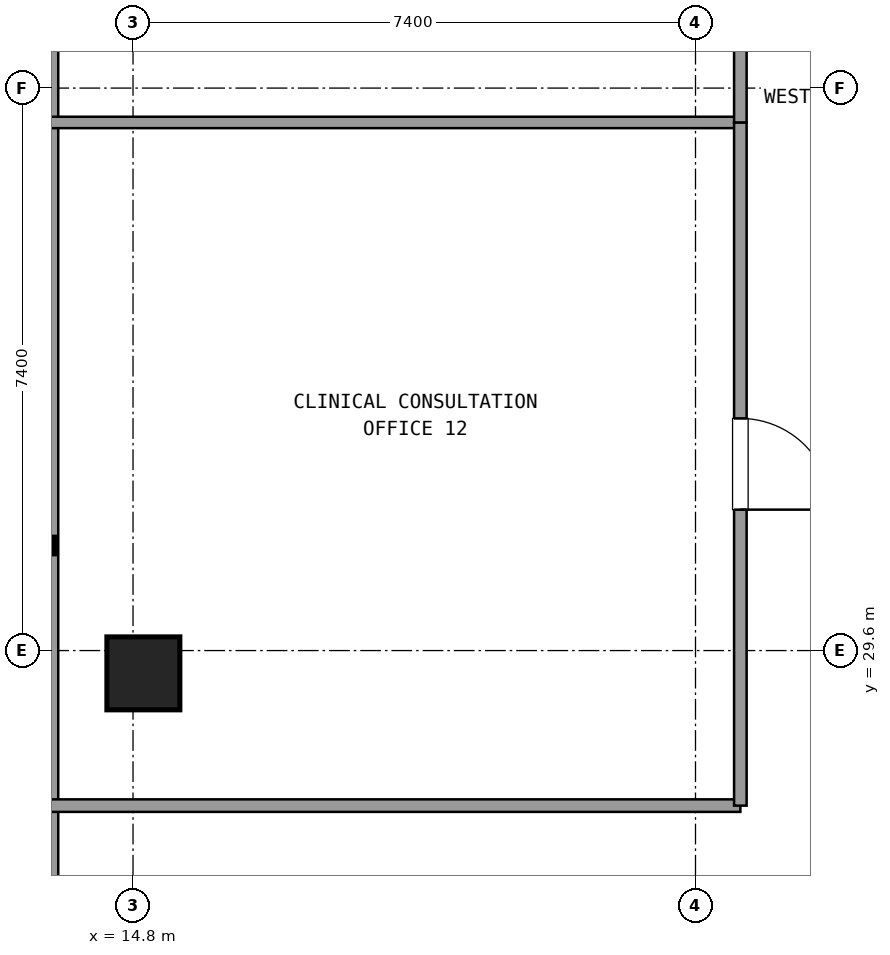
"""IFC4 building model, lengths in metres.
Left out: names, types, materials, properties, quantities, classifications, styles, units other than length and angle.
Written with IfcOpenShell. Run it as: python <this file> out.ifc"""

import sys

from ifc_helpers import new_model, si_unit, direction, frame, frame_2d, origin, origin_2d, place, context, subcontext, project, spatial, rectangle, extrude, element, fill, save


model = new_model("IFC4")
c1 = context("Model", 3, precision=1e-05, world=origin(), true_north=direction((0.0, 1.0)))
c2 = subcontext(c1, "Body", "Model", "MODEL_VIEW")
j1 = project(units=[si_unit("LENGTHUNIT", "METRE"), si_unit("PLANEANGLEUNIT", "RADIAN")], contexts=[c1])
p1 = place(None, origin())
s1 = spatial("IfcSite", under=j1, at=p1, CompositionType="ELEMENT")
p2 = place(p1, origin())
s2 = spatial("IfcBuilding", under=s1, at=p2, CompositionType="ELEMENT")
p3 = place(p2, frame((0.0, 0.0, 138.42)))
s3 = spatial("IfcBuildingStorey", under=s2, at=p3, CompositionType="ELEMENT", Elevation=138.42)
p4 = place(p3, frame((14.936, 29.3, 0.0), z_axis=(0.0, 0.0, 1.0), x_axis=(1.0, 0.0, 0.0)))
e1 = element("IfcColumn", 1, at=p4, inside=s3, PredefinedType="COLUMN", context=c2, shape_type="SweptSolid", body=[
    extrude(rectangle(XDim=0.96, YDim=0.96, at=origin_2d()), origin(), (0.0, 0.0, 1.0), 3.6),
])
p5 = place(p3, frame((13.696, 41.145, 0.0), z_axis=(0.0, 0.0, 1.0), x_axis=(0.0, -1.0, 0.0)))
e2 = element("IfcWall", 2, at=p5, inside=s3, PredefinedType="SOLIDWALL", context=c2, shape_type="SweptSolid", body=[
    extrude(rectangle(XDim=30.49, YDim=0.24, at=frame_2d((15.245, 0.0))), origin(), (0.0, 0.0, 1.0), 0.85),
])
p6 = place(p3, frame((13.716, 27.56, 0.0), z_axis=(0.0, 0.0, 1.0), x_axis=(1.0, 0.0, 0.0)))
e3 = element("IfcWall", 3, at=p6, inside=s3, PredefinedType="PARTITIONING", context=c2, shape_type="SweptSolid", body=[
    extrude(rectangle(XDim=9.074, YDim=0.165, at=frame_2d((4.537, 0.0))), origin(), (0.0, 0.0, 1.0), 2.61),
])
p7 = place(p3, frame((22.79, 36.548, 0.0), z_axis=(0.0, 0.0, 1.0), x_axis=(-1.0, 0.0, 0.0)))
e4 = element("IfcWall", 4, at=p7, inside=s3, PredefinedType="PARTITIONING", context=c2, shape_type="SweptSolid", body=[
    extrude(rectangle(XDim=9.074, YDim=0.15, at=frame_2d((4.537, 0.0))), origin(), (0.0, 0.0, 1.0), 2.61),
])
p8 = place(p3, frame((22.79, 27.56, 0.0), z_axis=(0.0, 0.0, 1.0), x_axis=(0.0, 1.0, 0.0)))
e5 = element("IfcWall", 5, at=p8, inside=s3, PredefinedType="PARTITIONING", context=c2, shape_type="SweptSolid", body=[
    extrude(rectangle(XDim=8.988, YDim=0.165, at=frame_2d((4.494, 0.0))), origin(), (0.0, 0.0, 1.0), 2.61),
])
p9 = place(p8, frame((3.894, 0.0, 0.0)))
e6 = element("IfcOpeningElement", 6, at=p9, cuts=e5, PredefinedType="OPENING", context=c2, shape_type="SweptSolid", body=[
    extrude(rectangle(XDim=1.2, YDim=2.15, at=frame_2d((0.6, 1.075))), frame((0.0, 0.093, 0.0), z_axis=(0.0, -1.0, 0.0), x_axis=(1.0, 0.0, 0.0)), (0.0, 0.0, 1.0), 0.185),
])
p10 = place(p3, frame((22.79, 36.548, 0.0), z_axis=(0.0, 0.0, 1.0), x_axis=(0.0, 1.0, 0.0)))
e7 = element("IfcWall", 7, at=p10, inside=s3, PredefinedType="PARTITIONING", context=c2, shape_type="SweptSolid", body=[
    extrude(rectangle(XDim=10.552, YDim=0.165, at=frame_2d((5.276, 0.0))), origin(), (0.0, 0.0, 1.0), 2.61),
])
p11 = place(p10, frame((4.676, 0.0, 0.0)))
e8 = element("IfcOpeningElement", 8, at=p11, cuts=e7, PredefinedType="OPENING", context=c2, shape_type="SweptSolid", body=[
    extrude(rectangle(XDim=1.2, YDim=2.15, at=frame_2d((0.6, 1.075))), frame((0.0, 0.093, 0.0), z_axis=(0.0, -1.0, 0.0), x_axis=(1.0, 0.0, 0.0)), (0.0, 0.0, 1.0), 0.185),
])
p12 = place(p9, frame((1.2, 0.0, 0.0), z_axis=(0.0, 0.0, 1.0), x_axis=(-1.0, 0.0, 0.0)))
e9 = element("IfcDoor", 9, at=p12, inside=s3, OperationType="SINGLE_SWING_LEFT", PredefinedType="DOOR", context=c2, shape_type="SweptSolid", body=[
    extrude(rectangle(XDim=1.2, YDim=2.15, at=frame_2d((0.6, 1.075))), frame((0.0, 0.025, 0.0), z_axis=(0.0, -1.0, 0.0), x_axis=(1.0, 0.0, 0.0)), (0.0, 0.0, 1.0), 0.05),
])
fill(e6, e9)
save(model, sys.argv[1])
